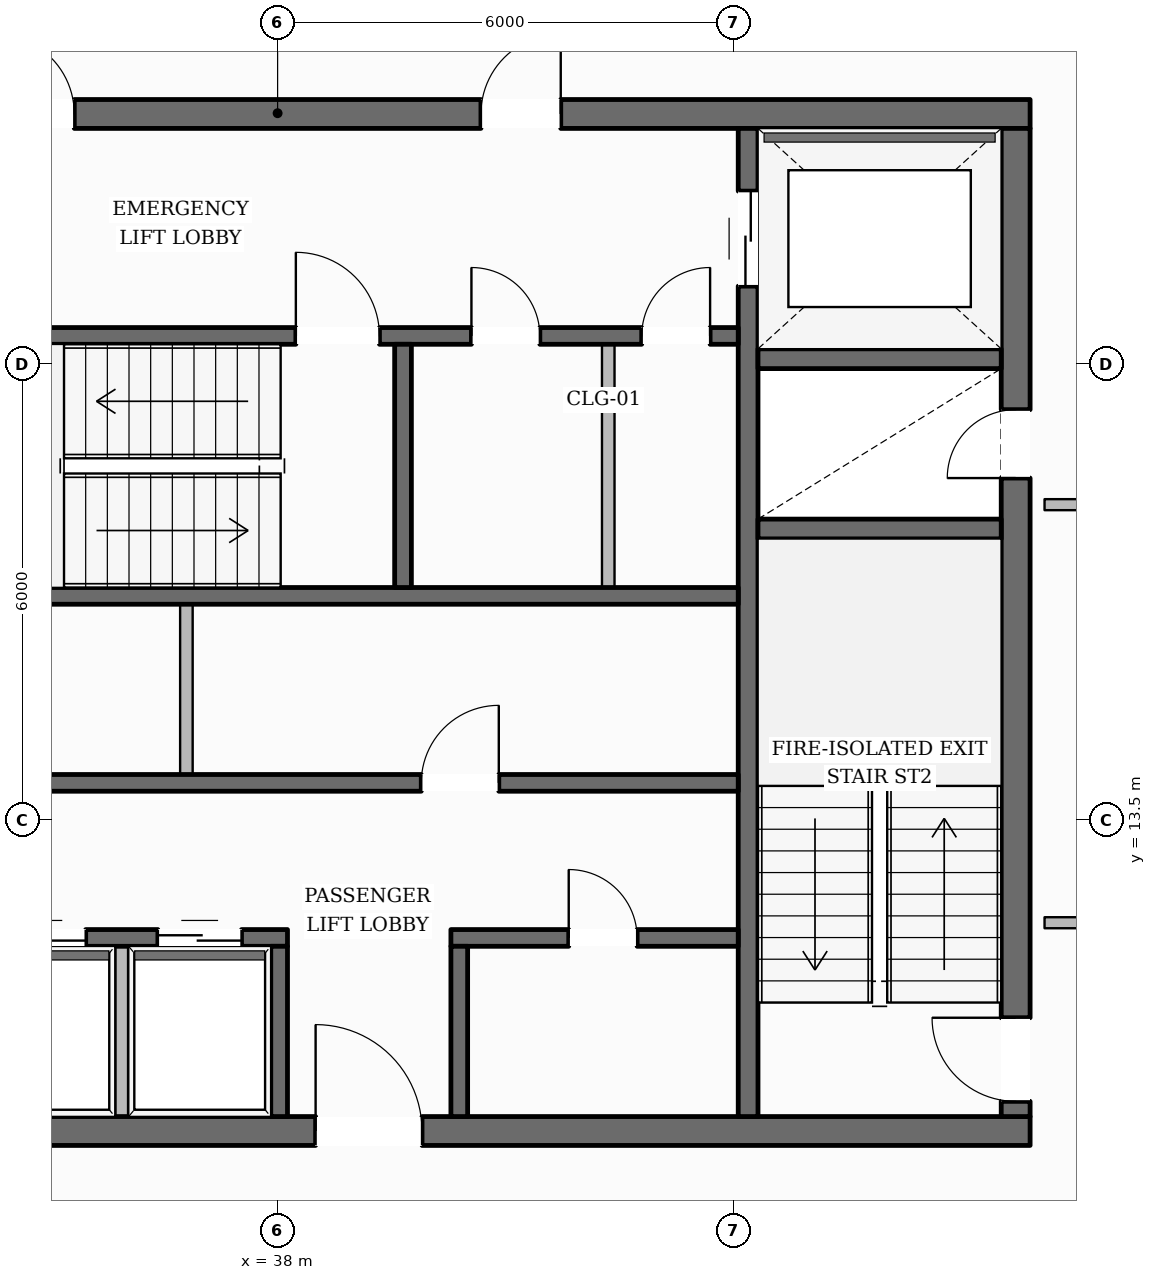
"""IFC4 building model, lengths in metres.
Left out: names, types, materials, properties, quantities, classifications, styles, units other than length and angle.
Written with IfcOpenShell. Run it as: python <this file> out.ifc"""

import sys

from ifc_helpers import new_model, si_unit, direction, frame, frame_2d, origin, place, context, subcontext, project, spatial, rectangle, extrude, element, fill, save


model = new_model("IFC4")
c1 = context("Model", 3, precision=1e-05, world=origin(), true_north=direction((0.0, 1.0)))
c2 = subcontext(c1, "Body", "Model", "MODEL_VIEW")
j1 = project(units=[si_unit("LENGTHUNIT", "METRE"), si_unit("PLANEANGLEUNIT", "RADIAN")], contexts=[c1])
p1 = place(None, origin())
s1 = spatial("IfcSite", under=j1, at=p1, CompositionType="ELEMENT")
p2 = place(p1, origin())
s2 = spatial("IfcBuilding", under=s1, at=p2, CompositionType="ELEMENT")
p3 = place(p2, frame((0.0, 0.0, 285.7)))
s3 = spatial("IfcBuildingStorey", under=s2, at=p3, CompositionType="ELEMENT", Elevation=285.7)
p4 = place(p3, frame((28.1, 9.41, 0.0), z_axis=(0.0, 0.0, 1.0), x_axis=(1.0, 0.0, 0.0)))
e1 = element("IfcWall", 1, at=p4, inside=s3, PredefinedType="SOLIDWALL", context=c2, shape_type="SweptSolid", body=[
    extrude(rectangle(XDim=19.8, YDim=0.38, at=frame_2d((9.9, 0.0))), origin(), (0.0, 0.0, 1.0), 3.61),
])
p5 = place(p4, frame((10.4, 0.0, 0.0)))
e2 = element("IfcOpeningElement", 2, at=p5, cuts=e1, PredefinedType="OPENING", context=c2, shape_type="SweptSolid", body=[
    extrude(rectangle(XDim=1.4, YDim=2.2, at=frame_2d((0.7, 1.1))), frame((0.0, 0.2, 0.0), z_axis=(0.0, -1.0, 0.0), x_axis=(1.0, 0.0, 0.0)), (0.0, 0.0, 1.0), 0.4),
])
p6 = place(p3, frame((28.1, 22.79, 0.0), z_axis=(0.0, 0.0, 1.0), x_axis=(1.0, 0.0, 0.0)))
e3 = element("IfcWall", 3, at=p6, inside=s3, PredefinedType="SOLIDWALL", context=c2, shape_type="SweptSolid", body=[
    extrude(rectangle(XDim=19.8, YDim=0.38, at=frame_2d((9.9, 0.0))), origin(), (0.0, 0.0, 1.0), 3.61),
])
p7 = place(p6, frame((6.175, 0.0, 0.0)))
e4 = element("IfcOpeningElement", 4, at=p7, cuts=e3, PredefinedType="OPENING", context=c2, shape_type="SweptSolid", body=[
    extrude(rectangle(XDim=1.05, YDim=2.15, at=frame_2d((0.525, 1.075))), frame((0.0, 0.2, 0.0), z_axis=(0.0, -1.0, 0.0), x_axis=(1.0, 0.0, 0.0)), (0.0, 0.0, 1.0), 0.4),
])
p8 = place(p6, frame((12.575, 0.0, 0.0)))
e5 = element("IfcOpeningElement", 5, at=p8, cuts=e3, PredefinedType="OPENING", context=c2, shape_type="SweptSolid", body=[
    extrude(rectangle(XDim=1.05, YDim=2.15, at=frame_2d((0.525, 1.075))), frame((0.0, 0.2, 0.0), z_axis=(0.0, -1.0, 0.0), x_axis=(1.0, 0.0, 0.0)), (0.0, 0.0, 1.0), 0.4),
])
p9 = place(p3, frame((47.71, 9.6, 0.0), z_axis=(0.0, 0.0, 1.0), x_axis=(0.0, 1.0, 0.0)))
e6 = element("IfcWall", 6, at=p9, inside=s3, PredefinedType="SOLIDWALL", context=c2, shape_type="SweptSolid", body=[
    extrude(rectangle(XDim=13.0, YDim=0.38, at=frame_2d((6.5, 0.0))), origin(), (0.0, 0.0, 1.0), 3.61),
])
p10 = place(p9, frame((0.2, 0.0, 0.0)))
e7 = element("IfcOpeningElement", 7, at=p10, cuts=e6, PredefinedType="OPENING", context=c2, shape_type="SweptSolid", body=[
    extrude(rectangle(XDim=1.1, YDim=2.15, at=frame_2d((0.55, 1.075))), frame((0.0, 0.2, 0.0), z_axis=(0.0, -1.0, 0.0), x_axis=(1.0, 0.0, 0.0)), (0.0, 0.0, 1.0), 0.4),
])
p11 = place(p9, frame((8.4, 0.0, 0.0)))
e8 = element("IfcOpeningElement", 8, at=p11, cuts=e6, PredefinedType="OPENING", context=c2, shape_type="SweptSolid", body=[
    extrude(rectangle(XDim=0.9, YDim=2.1, at=frame_2d((0.45, 1.05))), frame((0.0, 0.2, 0.0), z_axis=(0.0, -1.0, 0.0), x_axis=(1.0, 0.0, 0.0)), (0.0, 0.0, 1.0), 0.4),
])
p12 = place(p3, frame((44.19, 9.6, 0.0), z_axis=(0.0, 0.0, 1.0), x_axis=(0.0, 1.0, 0.0)))
e9 = element("IfcWall", 9, at=p12, inside=s3, PredefinedType="SHEAR", context=c2, shape_type="SweptSolid", body=[
    extrude(rectangle(XDim=13.0, YDim=0.26, at=frame_2d((6.5, 0.0))), origin(), (0.0, 0.0, 1.0), 3.61),
])
p13 = place(p12, frame((10.925, 0.0, 0.0)))
e10 = element("IfcOpeningElement", 10, at=p13, cuts=e9, PredefinedType="OPENING", context=c2, shape_type="SweptSolid", body=[
    extrude(rectangle(XDim=1.25, YDim=2.25, at=frame_2d((0.625, 1.125))), frame((0.0, 0.14, 0.0), z_axis=(0.0, -1.0, 0.0), x_axis=(1.0, 0.0, 0.0)), (0.0, 0.0, 1.0), 0.28),
])
for number, where, z_axis, x_axis in (
    (11, (44.32, 17.33, 0.0), (0.0, 0.0, 1.0), (1.0, 0.0, 0.0)),
    (12, (44.32, 19.57, 0.0), (0.0, 0.0, 1.0), (1.0, 0.0, 0.0)),
):
    element("IfcWall", number, at=place(p3, frame(where, z_axis=z_axis, x_axis=x_axis)), inside=s3, PredefinedType="SHEAR", context=c2, shape_type="SweptSolid", body=[
        extrude(rectangle(XDim=3.2, YDim=0.26, at=frame_2d((1.6, 0.0))), origin(), (0.0, 0.0, 1.0), 3.61),
    ])
p14 = place(p3, frame((31.94, 19.87, 0.0), z_axis=(0.0, 0.0, 1.0), x_axis=(1.0, 0.0, 0.0)))
e13 = element("IfcWall", 13, at=p14, inside=s3, PredefinedType="SOLIDWALL", context=c2, shape_type="SweptSolid", body=[
    extrude(rectangle(XDim=12.12, YDim=0.22, at=frame_2d((6.06, 0.0))), origin(), (0.0, 0.0, 1.0), 3.61),
])
p15 = place(p14, frame((6.3, 0.0, 0.0)))
e14 = element("IfcOpeningElement", 14, at=p15, cuts=e13, PredefinedType="OPENING", context=c2, shape_type="SweptSolid", body=[
    extrude(rectangle(XDim=1.1, YDim=2.15, at=frame_2d((0.55, 1.075))), frame((0.0, 0.12, 0.0), z_axis=(0.0, -1.0, 0.0), x_axis=(1.0, 0.0, 0.0)), (0.0, 0.0, 1.0), 0.24),
])
p16 = place(p14, frame((8.61, 0.0, 0.0)))
e15 = element("IfcOpeningElement", 15, at=p16, cuts=e13, PredefinedType="OPENING", context=c2, shape_type="SweptSolid", body=[
    extrude(rectangle(XDim=0.9, YDim=2.1, at=frame_2d((0.45, 1.05))), frame((0.0, 0.12, 0.0), z_axis=(0.0, -1.0, 0.0), x_axis=(1.0, 0.0, 0.0)), (0.0, 0.0, 1.0), 0.24),
])
p17 = place(p14, frame((10.85, 0.0, 0.0)))
e16 = element("IfcOpeningElement", 16, at=p17, cuts=e13, PredefinedType="OPENING", context=c2, shape_type="SweptSolid", body=[
    extrude(rectangle(XDim=0.9, YDim=2.1, at=frame_2d((0.45, 1.05))), frame((0.0, 0.12, 0.0), z_axis=(0.0, -1.0, 0.0), x_axis=(1.0, 0.0, 0.0)), (0.0, 0.0, 1.0), 0.24),
])
p18 = place(p3, frame((31.94, 16.45, 0.0), z_axis=(0.0, 0.0, 1.0), x_axis=(1.0, 0.0, 0.0)))
e17 = element("IfcWall", 17, at=p18, inside=s3, PredefinedType="SOLIDWALL", context=c2, shape_type="SweptSolid", body=[
    extrude(rectangle(XDim=12.12, YDim=0.22, at=frame_2d((6.06, 0.0))), origin(), (0.0, 0.0, 1.0), 3.61),
])
p19 = place(p3, frame((39.65, 16.56, 0.0), z_axis=(0.0, 0.0, 1.0), x_axis=(0.0, 1.0, 0.0)))
e18 = element("IfcWall", 18, at=p19, inside=s3, PredefinedType="SOLIDWALL", context=c2, shape_type="SweptSolid", body=[
    extrude(rectangle(XDim=3.2, YDim=0.22, at=frame_2d((1.6, 0.0))), origin(), (0.0, 0.0, 1.0), 3.61),
])
p20 = place(p3, frame((31.94, 13.99, 0.0), z_axis=(0.0, 0.0, 1.0), x_axis=(1.0, 0.0, 0.0)))
e19 = element("IfcWall", 19, at=p20, inside=s3, PredefinedType="SOLIDWALL", context=c2, shape_type="SweptSolid", body=[
    extrude(rectangle(XDim=12.12, YDim=0.22, at=frame_2d((6.06, 0.0))), origin(), (0.0, 0.0, 1.0), 3.61),
])
p21 = place(p20, frame((1.91, 0.0, 0.0)))
e20 = element("IfcOpeningElement", 20, at=p21, cuts=e19, PredefinedType="OPENING", context=c2, shape_type="SweptSolid", body=[
    extrude(rectangle(XDim=0.9, YDim=2.1, at=frame_2d((0.45, 1.05))), frame((0.0, 0.12, 0.0), z_axis=(0.0, -1.0, 0.0), x_axis=(1.0, 0.0, 0.0)), (0.0, 0.0, 1.0), 0.24),
])
p22 = place(p20, frame((7.95, 0.0, 0.0)))
e21 = element("IfcOpeningElement", 21, at=p22, cuts=e19, PredefinedType="OPENING", context=c2, shape_type="SweptSolid", body=[
    extrude(rectangle(XDim=1.02, YDim=2.15, at=frame_2d((0.51, 1.075))), frame((0.0, 0.12, 0.0), z_axis=(0.0, -1.0, 0.0), x_axis=(1.0, 0.0, 0.0)), (0.0, 0.0, 1.0), 0.24),
])
p23 = place(p3, frame((31.94, 11.95, 0.0), z_axis=(0.0, 0.0, 1.0), x_axis=(1.0, 0.0, 0.0)))
e22 = element("IfcWall", 22, at=p23, inside=s3, PredefinedType="SOLIDWALL", context=c2, shape_type="SweptSolid", body=[
    extrude(rectangle(XDim=6.19, YDim=0.22, at=frame_2d((3.095, 0.0))), origin(), (0.0, 0.0, 1.0), 3.61),
])
p24 = place(p23, frame((0.385, 0.0, 0.0)))
e23 = element("IfcOpeningElement", 23, at=p24, cuts=e22, PredefinedType="OPENING", context=c2, shape_type="SweptSolid", body=[
    extrude(rectangle(XDim=1.1, YDim=2.2, at=frame_2d((0.55, 1.1))), frame((0.0, 0.12, 0.0), z_axis=(0.0, -1.0, 0.0), x_axis=(1.0, 0.0, 0.0)), (0.0, 0.0, 1.0), 0.24),
])
p25 = place(p23, frame((2.435, 0.0, 0.0)))
e24 = element("IfcOpeningElement", 24, at=p25, cuts=e22, PredefinedType="OPENING", context=c2, shape_type="SweptSolid", body=[
    extrude(rectangle(XDim=1.1, YDim=2.2, at=frame_2d((0.55, 1.1))), frame((0.0, 0.12, 0.0), z_axis=(0.0, -1.0, 0.0), x_axis=(1.0, 0.0, 0.0)), (0.0, 0.0, 1.0), 0.24),
])
p26 = place(p23, frame((4.485, 0.0, 0.0)))
e25 = element("IfcOpeningElement", 25, at=p26, cuts=e22, PredefinedType="OPENING", context=c2, shape_type="SweptSolid", body=[
    extrude(rectangle(XDim=1.1, YDim=2.2, at=frame_2d((0.55, 1.1))), frame((0.0, 0.12, 0.0), z_axis=(0.0, -1.0, 0.0), x_axis=(1.0, 0.0, 0.0)), (0.0, 0.0, 1.0), 0.24),
])
p27 = place(p3, frame((40.28, 11.95, 0.0), z_axis=(0.0, 0.0, 1.0), x_axis=(1.0, 0.0, 0.0)))
e26 = element("IfcWall", 26, at=p27, inside=s3, PredefinedType="SOLIDWALL", context=c2, shape_type="SweptSolid", body=[
    extrude(rectangle(XDim=3.78, YDim=0.22, at=frame_2d((1.89, 0.0))), origin(), (0.0, 0.0, 1.0), 3.61),
])
p28 = place(p27, frame((1.55, 0.0, 0.0)))
e27 = element("IfcOpeningElement", 27, at=p28, cuts=e26, PredefinedType="OPENING", context=c2, shape_type="SweptSolid", body=[
    extrude(rectangle(XDim=0.9, YDim=2.1, at=frame_2d((0.45, 1.05))), frame((0.0, 0.12, 0.0), z_axis=(0.0, -1.0, 0.0), x_axis=(1.0, 0.0, 0.0)), (0.0, 0.0, 1.0), 0.24),
])
for number, where, z_axis, x_axis in (
    (28, (38.02, 9.6, 0.0), (0.0, 0.0, 1.0), (0.0, 1.0, 0.0)),
    (29, (40.39, 9.6, 0.0), (0.0, 0.0, 1.0), (0.0, 1.0, 0.0)),
):
    element("IfcWall", number, at=place(p3, frame(where, z_axis=z_axis, x_axis=x_axis)), inside=s3, PredefinedType="SOLIDWALL", context=c2, shape_type="SweptSolid", body=[
        extrude(rectangle(XDim=2.24, YDim=0.22, at=frame_2d((1.12, 0.0))), origin(), (0.0, 0.0, 1.0), 3.61),
    ])
p29 = place(p3, frame((15.195, 10.019, 0.0), z_axis=(0.0, 0.0, 1.0), x_axis=(0.508088294866, 0.861304989316, 0.0)))
e30 = element("IfcWall", 30, at=p29, inside=s3, PredefinedType="STANDARD", context=c2, shape_type="SweptSolid", body=[
    extrude(rectangle(XDim=39.26, YDim=0.35, at=frame_2d((19.63, 0.0))), origin(), (0.0, 0.0, 1.0), 3.196),
])
p30 = place(p29, frame((28.845, 0.0, 0.0)))
e31 = element("IfcOpeningElement", 31, at=p30, cuts=e30, PredefinedType="OPENING", context=c2, shape_type="SweptSolid", body=[
    extrude(rectangle(XDim=1.0, YDim=2.2, at=frame_2d((0.5, 1.1))), frame((0.0, 0.185, 0.0), z_axis=(0.0, -1.0, 0.0), x_axis=(1.0, 0.0, 0.0)), (0.0, 0.0, 1.0), 0.37),
])
p31 = place(p29, frame((34.922, 0.0, 0.65)))
e32 = element("IfcOpeningElement", 32, at=p31, cuts=e30, PredefinedType="OPENING", context=c2, shape_type="SweptSolid", body=[
    extrude(rectangle(XDim=1.35, YDim=1.75, at=frame_2d((0.675, 0.875))), frame((0.0, 0.185, 0.0), z_axis=(0.0, -1.0, 0.0), x_axis=(1.0, 0.0, 0.0)), (0.0, 0.0, 1.0), 0.37),
])
p32 = place(p29, frame((22.152, 0.0, 0.65)))
e33 = element("IfcOpeningElement", 33, at=p32, cuts=e30, PredefinedType="OPENING", context=c2, shape_type="SweptSolid", body=[
    extrude(rectangle(XDim=1.35, YDim=1.75, at=frame_2d((0.675, 0.875))), frame((0.0, 0.185, 0.0), z_axis=(0.0, -1.0, 0.0), x_axis=(1.0, 0.0, 0.0)), (0.0, 0.0, 1.0), 0.37),
])
p33 = place(p29, frame((9.382, 0.0, 0.65)))
e34 = element("IfcOpeningElement", 34, at=p33, cuts=e30, PredefinedType="OPENING", context=c2, shape_type="SweptSolid", body=[
    extrude(rectangle(XDim=1.35, YDim=1.75, at=frame_2d((0.675, 0.875))), frame((0.0, 0.185, 0.0), z_axis=(0.0, -1.0, 0.0), x_axis=(1.0, 0.0, 0.0)), (0.0, 0.0, 1.0), 0.37),
])
p34 = place(p29, frame((2.997, 0.0, 0.65)))
e35 = element("IfcOpeningElement", 35, at=p34, cuts=e30, PredefinedType="OPENING", context=c2, shape_type="SweptSolid", body=[
    extrude(rectangle(XDim=1.35, YDim=1.75, at=frame_2d((0.675, 0.875))), frame((0.0, 0.185, 0.0), z_axis=(0.0, -1.0, 0.0), x_axis=(1.0, 0.0, 0.0)), (0.0, 0.0, 1.0), 0.37),
])
p35 = place(p3, frame((40.742, 43.905, 0.0), z_axis=(0.0, 0.0, 1.0), x_axis=(0.49863744838, -0.866810645454, 0.0)))
e36 = element("IfcWall", 36, at=p35, inside=s3, PredefinedType="STANDARD", context=c2, shape_type="SweptSolid", body=[
    extrude(rectangle(XDim=38.525, YDim=0.35, at=frame_2d((19.262, 0.0))), origin(), (0.0, 0.0, 1.0), 3.196),
])
p36 = place(p35, frame((34.24, 0.0, 0.65)))
e37 = element("IfcOpeningElement", 37, at=p36, cuts=e36, PredefinedType="OPENING", context=c2, shape_type="SweptSolid", body=[
    extrude(rectangle(XDim=1.35, YDim=1.75, at=frame_2d((0.675, 0.875))), frame((0.0, 0.185, 0.0), z_axis=(0.0, -1.0, 0.0), x_axis=(1.0, 0.0, 0.0)), (0.0, 0.0, 1.0), 0.37),
])
p37 = place(p35, frame((27.979, 0.0, 0.65)))
e38 = element("IfcOpeningElement", 38, at=p37, cuts=e36, PredefinedType="OPENING", context=c2, shape_type="SweptSolid", body=[
    extrude(rectangle(XDim=1.35, YDim=1.75, at=frame_2d((0.675, 0.875))), frame((0.0, 0.185, 0.0), z_axis=(0.0, -1.0, 0.0), x_axis=(1.0, 0.0, 0.0)), (0.0, 0.0, 1.0), 0.37),
])
p38 = place(p35, frame((21.719, 0.0, 0.65)))
e39 = element("IfcOpeningElement", 39, at=p38, cuts=e36, PredefinedType="OPENING", context=c2, shape_type="SweptSolid", body=[
    extrude(rectangle(XDim=1.35, YDim=1.75, at=frame_2d((0.675, 0.875))), frame((0.0, 0.185, 0.0), z_axis=(0.0, -1.0, 0.0), x_axis=(1.0, 0.0, 0.0)), (0.0, 0.0, 1.0), 0.37),
])
p39 = place(p35, frame((9.197, 0.0, 0.65)))
e40 = element("IfcOpeningElement", 40, at=p39, cuts=e36, PredefinedType="OPENING", context=c2, shape_type="SweptSolid", body=[
    extrude(rectangle(XDim=1.35, YDim=1.75, at=frame_2d((0.675, 0.875))), frame((0.0, 0.185, 0.0), z_axis=(0.0, -1.0, 0.0), x_axis=(1.0, 0.0, 0.0)), (0.0, 0.0, 1.0), 0.37),
])
p40 = place(p35, frame((2.936, 0.0, 0.65)))
e41 = element("IfcOpeningElement", 41, at=p40, cuts=e36, PredefinedType="OPENING", context=c2, shape_type="SweptSolid", body=[
    extrude(rectangle(XDim=1.35, YDim=1.75, at=frame_2d((0.675, 0.875))), frame((0.0, 0.185, 0.0), z_axis=(0.0, -1.0, 0.0), x_axis=(1.0, 0.0, 0.0)), (0.0, 0.0, 1.0), 0.37),
])
p41 = place(p3, frame((35.95, 9.49, 0.0), z_axis=(0.0, 0.0, 1.0), x_axis=(0.0, 1.0, 0.0)))
e42 = element("IfcWall", 42, at=p41, inside=s3, PredefinedType="PARTITIONING", context=c2, shape_type="SweptSolid", body=[
    extrude(rectangle(XDim=2.35, YDim=0.165, at=frame_2d((1.175, 0.0))), origin(), (0.0, 0.0, 1.0), 3.61),
])
p42 = place(p3, frame((36.8, 14.1, 0.0), z_axis=(0.0, 0.0, 1.0), x_axis=(0.0, 1.0, 0.0)))
e43 = element("IfcWall", 43, at=p42, inside=s3, PredefinedType="PARTITIONING", context=c2, shape_type="SweptSolid", body=[
    extrude(rectangle(XDim=2.24, YDim=0.165, at=frame_2d((1.12, 0.0))), origin(), (0.0, 0.0, 1.0), 3.61),
])
p43 = place(p3, frame((42.35, 16.56, 0.0), z_axis=(0.0, 0.0, 1.0), x_axis=(0.0, 1.0, 0.0)))
e44 = element("IfcWall", 44, at=p43, inside=s3, PredefinedType="PARTITIONING", context=c2, shape_type="SweptSolid", body=[
    extrude(rectangle(XDim=3.2, YDim=0.165, at=frame_2d((1.6, 0.0))), origin(), (0.0, 0.0, 1.0), 3.61),
])
for number, where, z_axis, x_axis in (
    (45, (49.91, 17.65, 0.0), (0.0, 0.0, 1.0), (-1.0, 0.0, 0.0)),
    (46, (48.09, 12.15, 0.0), (0.0, 0.0, 1.0), (1.0, 0.0, 0.0)),
):
    element("IfcWall", number, at=place(p3, frame(where, z_axis=z_axis, x_axis=x_axis)), inside=s3, PredefinedType="PARTITIONING", context=c2, shape_type="SweptSolid", body=[
        extrude(rectangle(XDim=1.82, YDim=0.145, at=frame_2d((0.91, 0.0))), origin(), (0.0, 0.0, 1.0), 3.61),
    ])
p44 = place(p10, origin())
e47 = element("IfcDoor", 47, at=p44, inside=s3, OperationType="SINGLE_SWING_RIGHT", PredefinedType="DOOR", context=c2, shape_type="SweptSolid", body=[
    extrude(rectangle(XDim=1.1, YDim=2.15, at=frame_2d((0.55, 1.075))), frame((0.0, 0.025, 0.0), z_axis=(0.0, -1.0, 0.0), x_axis=(1.0, 0.0, 0.0)), (0.0, 0.0, 1.0), 0.05),
])
fill(e7, e47)
p45 = place(p15, origin())
e48 = element("IfcDoor", 48, at=p45, inside=s3, OperationType="SINGLE_SWING_LEFT", PredefinedType="DOOR", context=c2, shape_type="SweptSolid", body=[
    extrude(rectangle(XDim=1.1, YDim=2.15, at=frame_2d((0.55, 1.075))), frame((0.0, 0.025, 0.0), z_axis=(0.0, -1.0, 0.0), x_axis=(1.0, 0.0, 0.0)), (0.0, 0.0, 1.0), 0.05),
])
fill(e14, e48)
p46 = place(p11, origin())
e49 = element("IfcDoor", 49, at=p46, inside=s3, OperationType="SINGLE_SWING_LEFT", PredefinedType="DOOR", context=c2, shape_type="SweptSolid", body=[
    extrude(rectangle(XDim=0.9, YDim=2.1, at=frame_2d((0.45, 1.05))), frame((0.0, 0.025, 0.0), z_axis=(0.0, -1.0, 0.0), x_axis=(1.0, 0.0, 0.0)), (0.0, 0.0, 1.0), 0.05),
])
fill(e8, e49)
p47 = place(p7, origin())
e50 = element("IfcDoor", 50, at=p47, inside=s3, OperationType="SINGLE_SWING_LEFT", PredefinedType="DOOR", context=c2, shape_type="SweptSolid", body=[
    extrude(rectangle(XDim=1.05, YDim=2.15, at=frame_2d((0.525, 1.075))), frame((0.0, 0.025, 0.0), z_axis=(0.0, -1.0, 0.0), x_axis=(1.0, 0.0, 0.0)), (0.0, 0.0, 1.0), 0.05),
])
fill(e4, e50)
p48 = place(p8, origin())
e51 = element("IfcDoor", 51, at=p48, inside=s3, OperationType="SINGLE_SWING_RIGHT", PredefinedType="DOOR", context=c2, shape_type="SweptSolid", body=[
    extrude(rectangle(XDim=1.05, YDim=2.15, at=frame_2d((0.525, 1.075))), frame((0.0, 0.025, 0.0), z_axis=(0.0, -1.0, 0.0), x_axis=(1.0, 0.0, 0.0)), (0.0, 0.0, 1.0), 0.05),
])
fill(e5, e51)
p49 = place(p13, origin())
e52 = element("IfcDoor", 52, at=p49, inside=s3, OperationType="DOUBLE_DOOR_SLIDING", PredefinedType="DOOR", context=c2, shape_type="SweptSolid", body=[
    extrude(rectangle(XDim=1.25, YDim=2.25, at=frame_2d((0.625, 1.125))), frame((0.0, 0.025, 0.0), z_axis=(0.0, -1.0, 0.0), x_axis=(1.0, 0.0, 0.0)), (0.0, 0.0, 1.0), 0.05),
])
fill(e10, e52)
p50 = place(p5, origin())
e53 = element("IfcDoor", 53, at=p50, inside=s3, OperationType="SINGLE_SWING_LEFT", PredefinedType="DOOR", context=c2, shape_type="SweptSolid", body=[
    extrude(rectangle(XDim=1.4, YDim=2.2, at=frame_2d((0.7, 1.1))), frame((0.0, 0.025, 0.0), z_axis=(0.0, -1.0, 0.0), x_axis=(1.0, 0.0, 0.0)), (0.0, 0.0, 1.0), 0.05),
])
fill(e2, e53)
p51 = place(p25, origin())
e54 = element("IfcDoor", 54, at=p51, inside=s3, OperationType="DOUBLE_DOOR_SLIDING", PredefinedType="DOOR", context=c2, shape_type="SweptSolid", body=[
    extrude(rectangle(XDim=1.1, YDim=2.2, at=frame_2d((0.55, 1.1))), frame((0.0, 0.025, 0.0), z_axis=(0.0, -1.0, 0.0), x_axis=(1.0, 0.0, 0.0)), (0.0, 0.0, 1.0), 0.05),
])
fill(e24, e54)
p52 = place(p26, origin())
e55 = element("IfcDoor", 55, at=p52, inside=s3, OperationType="DOUBLE_DOOR_SLIDING", PredefinedType="DOOR", context=c2, shape_type="SweptSolid", body=[
    extrude(rectangle(XDim=1.1, YDim=2.2, at=frame_2d((0.55, 1.1))), frame((0.0, 0.025, 0.0), z_axis=(0.0, -1.0, 0.0), x_axis=(1.0, 0.0, 0.0)), (0.0, 0.0, 1.0), 0.05),
])
fill(e25, e55)
p53 = place(p22, origin())
e56 = element("IfcDoor", 56, at=p53, inside=s3, OperationType="SINGLE_SWING_RIGHT", PredefinedType="DOOR", context=c2, shape_type="SweptSolid", body=[
    extrude(rectangle(XDim=1.02, YDim=2.15, at=frame_2d((0.51, 1.075))), frame((0.0, 0.025, 0.0), z_axis=(0.0, -1.0, 0.0), x_axis=(1.0, 0.0, 0.0)), (0.0, 0.0, 1.0), 0.05),
])
fill(e21, e56)
p54 = place(p16, origin())
e57 = element("IfcDoor", 57, at=p54, inside=s3, OperationType="SINGLE_SWING_LEFT", PredefinedType="DOOR", context=c2, shape_type="SweptSolid", body=[
    extrude(rectangle(XDim=0.9, YDim=2.1, at=frame_2d((0.45, 1.05))), frame((0.0, 0.025, 0.0), z_axis=(0.0, -1.0, 0.0), x_axis=(1.0, 0.0, 0.0)), (0.0, 0.0, 1.0), 0.05),
])
fill(e15, e57)
p55 = place(p17, origin())
e58 = element("IfcDoor", 58, at=p55, inside=s3, OperationType="SINGLE_SWING_RIGHT", PredefinedType="DOOR", context=c2, shape_type="SweptSolid", body=[
    extrude(rectangle(XDim=0.9, YDim=2.1, at=frame_2d((0.45, 1.05))), frame((0.0, 0.025, 0.0), z_axis=(0.0, -1.0, 0.0), x_axis=(1.0, 0.0, 0.0)), (0.0, 0.0, 1.0), 0.05),
])
fill(e16, e58)
p56 = place(p28, origin())
e59 = element("IfcDoor", 59, at=p56, inside=s3, OperationType="SINGLE_SWING_LEFT", PredefinedType="DOOR", context=c2, shape_type="SweptSolid", body=[
    extrude(rectangle(XDim=0.9, YDim=2.1, at=frame_2d((0.45, 1.05))), frame((0.0, 0.025, 0.0), z_axis=(0.0, -1.0, 0.0), x_axis=(1.0, 0.0, 0.0)), (0.0, 0.0, 1.0), 0.05),
])
fill(e27, e59)
save(model, sys.argv[1])
